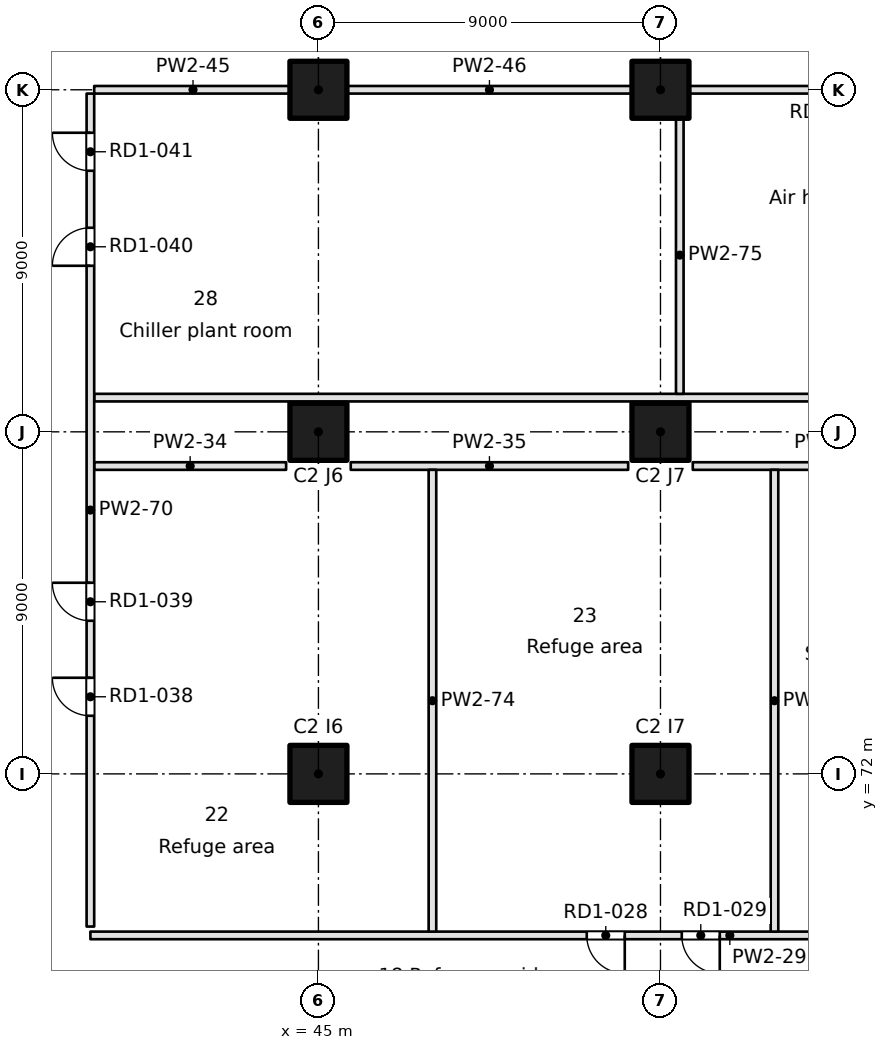
"""IFC4 building model, lengths in metres.
Left out: names, types, materials, properties, quantities, classifications, styles, units other than length and angle.
Written with IfcOpenShell. Run it as: python <this file> out.ifc"""

import sys

from ifc_helpers import new_model, si_unit, direction, frame, frame_2d, origin, origin_2d, place, context, subcontext, project, spatial, rectangle, extrude, element, fill, save


model = new_model("IFC4")
c1 = context("Model", 3, precision=1e-05, world=origin(), true_north=direction((0.0, 1.0)))
c2 = subcontext(c1, "Body", "Model", "MODEL_VIEW")
j1 = project(units=[si_unit("LENGTHUNIT", "METRE"), si_unit("PLANEANGLEUNIT", "RADIAN")], contexts=[c1])
p1 = place(None, origin())
s1 = spatial("IfcSite", under=j1, at=p1, CompositionType="ELEMENT")
p2 = place(p1, origin())
s2 = spatial("IfcBuilding", under=s1, at=p2, CompositionType="ELEMENT")
p3 = place(p2, frame((0.0, 0.0, 31.2)))
s3 = spatial("IfcBuildingStorey", under=s2, at=p3, CompositionType="ELEMENT", Elevation=31.2)
for number, where, z_axis, x_axis in (
    (1, (45.0, 72.0, 0.0), (0.0, 0.0, 1.0), (1.0, 0.0, 0.0)),
    (2, (45.0, 81.0, 0.0), (0.0, 0.0, 1.0), (1.0, 0.0, 0.0)),
    (3, (45.0, 90.0, 0.0), (0.0, 0.0, 1.0), (1.0, 0.0, 0.0)),
    (4, (54.0, 72.0, 0.0), (0.0, 0.0, 1.0), (1.0, 0.0, 0.0)),
    (5, (54.0, 81.0, 0.0), (0.0, 0.0, 1.0), (1.0, 0.0, 0.0)),
    (6, (54.0, 90.0, 0.0), (0.0, 0.0, 1.0), (1.0, 0.0, 0.0)),
):
    element("IfcColumn", number, at=place(p3, frame(where, z_axis=z_axis, x_axis=x_axis)), inside=s3, PredefinedType="COLUMN", context=c2, shape_type="SweptSolid", body=[
        extrude(rectangle(XDim=1.5, YDim=1.5, at=origin_2d()), origin(), (0.0, 0.0, 1.0), 4.6),
    ])
p4 = place(p3, frame((39.0, 67.75, 0.0), z_axis=(0.0, 0.0, 1.0), x_axis=(1.0, 0.0, 0.0)))
e7 = element("IfcWall", 7, at=p4, inside=s3, PredefinedType="PARTITIONING", context=c2, shape_type="SweptSolid", body=[
    extrude(rectangle(XDim=33.65, YDim=0.2, at=frame_2d((16.825, 0.0))), origin(), (0.0, 0.0, 1.0), 4.2),
])
p5 = place(p4, frame((13.06, 0.0, 0.0)))
e8 = element("IfcOpeningElement", 8, at=p5, cuts=e7, PredefinedType="OPENING", context=c2, shape_type="SweptSolid", body=[
    extrude(rectangle(XDim=1.0, YDim=2.1, at=frame_2d((0.5, 1.05))), frame((0.0, 0.1, 0.0), z_axis=(0.0, -1.0, 0.0), x_axis=(1.0, 0.0, 0.0)), (0.0, 0.0, 1.0), 0.2),
])
p6 = place(p4, frame((15.56, 0.0, 0.0)))
e9 = element("IfcOpeningElement", 9, at=p6, cuts=e7, PredefinedType="OPENING", context=c2, shape_type="SweptSolid", body=[
    extrude(rectangle(XDim=1.0, YDim=2.1, at=frame_2d((0.5, 1.05))), frame((0.0, 0.1, 0.0), z_axis=(0.0, -1.0, 0.0), x_axis=(1.0, 0.0, 0.0)), (0.0, 0.0, 1.0), 0.2),
])
p7 = place(p4, frame((22.101, 0.0, 0.0)))
e10 = element("IfcOpeningElement", 10, at=p7, cuts=e7, PredefinedType="OPENING", context=c2, shape_type="SweptSolid", body=[
    extrude(rectangle(XDim=1.0, YDim=2.1, at=frame_2d((0.5, 1.05))), frame((0.0, 0.1, 0.0), z_axis=(0.0, -1.0, 0.0), x_axis=(1.0, 0.0, 0.0)), (0.0, 0.0, 1.0), 0.2),
])
p8 = place(p4, frame((24.601, 0.0, 0.0)))
e11 = element("IfcOpeningElement", 11, at=p8, cuts=e7, PredefinedType="OPENING", context=c2, shape_type="SweptSolid", body=[
    extrude(rectangle(XDim=1.0, YDim=2.1, at=frame_2d((0.5, 1.05))), frame((0.0, 0.1, 0.0), z_axis=(0.0, -1.0, 0.0), x_axis=(1.0, 0.0, 0.0)), (0.0, 0.0, 1.0), 0.2),
])
p9 = place(p4, frame((29.76, 0.0, 0.0)))
e12 = element("IfcOpeningElement", 12, at=p9, cuts=e7, PredefinedType="OPENING", context=c2, shape_type="SweptSolid", body=[
    extrude(rectangle(XDim=1.0, YDim=2.1, at=frame_2d((0.5, 1.05))), frame((0.0, 0.1, 0.0), z_axis=(0.0, -1.0, 0.0), x_axis=(1.0, 0.0, 0.0)), (0.0, 0.0, 1.0), 0.2),
])
p10 = place(p4, frame((32.26, 0.0, 0.0)))
e13 = element("IfcOpeningElement", 13, at=p10, cuts=e7, PredefinedType="OPENING", context=c2, shape_type="SweptSolid", body=[
    extrude(rectangle(XDim=1.0, YDim=2.1, at=frame_2d((0.5, 1.05))), frame((0.0, 0.1, 0.0), z_axis=(0.0, -1.0, 0.0), x_axis=(1.0, 0.0, 0.0)), (0.0, 0.0, 1.0), 0.2),
])
p11 = place(p3, frame((39.1, 80.1, 0.0), z_axis=(0.0, 0.0, 1.0), x_axis=(1.0, 0.0, 0.0)))
e14 = element("IfcWall", 14, at=p11, inside=s3, PredefinedType="PARTITIONING", context=c2, shape_type="SweptSolid", body=[
    extrude(rectangle(XDim=5.05, YDim=0.2, at=frame_2d((2.525, 0.0))), origin(), (0.0, 0.0, 1.0), 4.2),
])
for number, where, z_axis, x_axis in (
    (15, (45.85, 80.1, 0.0), (0.0, 0.0, 1.0), (1.0, 0.0, 0.0)),
    (16, (54.85, 80.1, 0.0), (0.0, 0.0, 1.0), (1.0, 0.0, 0.0)),
):
    element("IfcWall", number, at=place(p3, frame(where, z_axis=z_axis, x_axis=x_axis)), inside=s3, PredefinedType="PARTITIONING", context=c2, shape_type="SweptSolid", body=[
        extrude(rectangle(XDim=7.3, YDim=0.2, at=frame_2d((3.65, 0.0))), origin(), (0.0, 0.0, 1.0), 4.2),
    ])
p12 = place(p3, frame((39.1, 81.9, 0.0), z_axis=(0.0, 0.0, 1.0), x_axis=(1.0, 0.0, 0.0)))
e17 = element("IfcWall", 17, at=p12, inside=s3, PredefinedType="PARTITIONING", context=c2, shape_type="SweptSolid", body=[
    extrude(rectangle(XDim=41.05, YDim=0.2, at=frame_2d((20.525, 0.0))), origin(), (0.0, 0.0, 1.0), 4.2),
])
p13 = place(p3, frame((44.3, 90.0, 0.0), z_axis=(0.0, 0.0, 1.0), x_axis=(-1.0, 0.0, 0.0)))
e18 = element("IfcWall", 18, at=p13, inside=s3, PredefinedType="PARTITIONING", context=c2, shape_type="SweptSolid", body=[
    extrude(rectangle(XDim=5.2, YDim=0.2, at=frame_2d((2.6, 0.0))), origin(), (0.0, 0.0, 1.0), 4.2),
])
p14 = place(p3, frame((53.3, 90.0, 0.0), z_axis=(0.0, 0.0, 1.0), x_axis=(-1.0, 0.0, 0.0)))
e19 = element("IfcWall", 19, at=p14, inside=s3, PredefinedType="PARTITIONING", context=c2, shape_type="SweptSolid", body=[
    extrude(rectangle(XDim=7.6, YDim=0.2, at=frame_2d((3.8, 0.0))), origin(), (0.0, 0.0, 1.0), 4.2),
])
p15 = place(p3, frame((62.3, 90.0, 0.0), z_axis=(0.0, 0.0, 1.0), x_axis=(-1.0, 0.0, 0.0)))
e20 = element("IfcWall", 20, at=p15, inside=s3, PredefinedType="PARTITIONING", context=c2, shape_type="SweptSolid", body=[
    extrude(rectangle(XDim=7.6, YDim=0.2, at=frame_2d((3.8, 0.0))), origin(), (0.0, 0.0, 1.0), 4.2),
])
p16 = place(p15, frame((3.3, 0.0, 0.0)))
e21 = element("IfcOpeningElement", 21, at=p16, cuts=e20, PredefinedType="OPENING", context=c2, shape_type="SweptSolid", body=[
    extrude(rectangle(XDim=1.0, YDim=2.1, at=frame_2d((0.5, 1.05))), frame((0.0, 0.1, 0.0), z_axis=(0.0, -1.0, 0.0), x_axis=(1.0, 0.0, 0.0)), (0.0, 0.0, 1.0), 0.2),
])
p17 = place(p3, frame((39.0, 89.9, 0.0), z_axis=(0.0, 0.0, 1.0), x_axis=(0.0, -1.0, 0.0)))
e22 = element("IfcWall", 22, at=p17, inside=s3, PredefinedType="PARTITIONING", context=c2, shape_type="SweptSolid", body=[
    extrude(rectangle(XDim=21.917, YDim=0.2, at=frame_2d((10.958, 0.0))), origin(), (0.0, 0.0, 1.0), 4.2),
])
p18 = place(p17, frame((15.371, 0.0, 0.0)))
e23 = element("IfcOpeningElement", 23, at=p18, cuts=e22, PredefinedType="OPENING", context=c2, shape_type="SweptSolid", body=[
    extrude(rectangle(XDim=1.0, YDim=2.1, at=frame_2d((0.5, 1.05))), frame((0.0, 0.1, 0.0), z_axis=(0.0, -1.0, 0.0), x_axis=(1.0, 0.0, 0.0)), (0.0, 0.0, 1.0), 0.2),
])
p19 = place(p17, frame((12.871, 0.0, 0.0)))
e24 = element("IfcOpeningElement", 24, at=p19, cuts=e22, PredefinedType="OPENING", context=c2, shape_type="SweptSolid", body=[
    extrude(rectangle(XDim=1.0, YDim=2.1, at=frame_2d((0.5, 1.05))), frame((0.0, 0.1, 0.0), z_axis=(0.0, -1.0, 0.0), x_axis=(1.0, 0.0, 0.0)), (0.0, 0.0, 1.0), 0.2),
])
p20 = place(p17, frame((3.531, 0.0, 0.0)))
e25 = element("IfcOpeningElement", 25, at=p20, cuts=e22, PredefinedType="OPENING", context=c2, shape_type="SweptSolid", body=[
    extrude(rectangle(XDim=1.0, YDim=2.1, at=frame_2d((0.5, 1.05))), frame((0.0, 0.1, 0.0), z_axis=(0.0, -1.0, 0.0), x_axis=(1.0, 0.0, 0.0)), (0.0, 0.0, 1.0), 0.2),
])
p21 = place(p17, frame((1.031, 0.0, 0.0)))
e26 = element("IfcOpeningElement", 26, at=p21, cuts=e22, PredefinedType="OPENING", context=c2, shape_type="SweptSolid", body=[
    extrude(rectangle(XDim=1.0, YDim=2.1, at=frame_2d((0.5, 1.05))), frame((0.0, 0.1, 0.0), z_axis=(0.0, -1.0, 0.0), x_axis=(1.0, 0.0, 0.0)), (0.0, 0.0, 1.0), 0.2),
])
p22 = place(p3, frame((48.0, 80.0, 0.0), z_axis=(0.0, 0.0, 1.0), x_axis=(0.0, -1.0, 0.0)))
e27 = element("IfcWall", 27, at=p22, inside=s3, PredefinedType="PARTITIONING", context=c2, shape_type="SweptSolid", body=[
    extrude(rectangle(XDim=12.15, YDim=0.2, at=frame_2d((6.075, 0.0))), origin(), (0.0, 0.0, 1.0), 4.2),
])
p23 = place(p3, frame((54.508, 89.3, 0.0), z_axis=(0.0, 0.0, 1.0), x_axis=(0.0, -1.0, 0.0)))
e28 = element("IfcWall", 28, at=p23, inside=s3, PredefinedType="PARTITIONING", context=c2, shape_type="SweptSolid", body=[
    extrude(rectangle(XDim=7.3, YDim=0.2, at=frame_2d((3.65, 0.0))), origin(), (0.0, 0.0, 1.0), 4.2),
])
p24 = place(p3, frame((57.0, 80.0, 0.0), z_axis=(0.0, 0.0, 1.0), x_axis=(0.0, -1.0, 0.0)))
e29 = element("IfcWall", 29, at=p24, inside=s3, PredefinedType="PARTITIONING", context=c2, shape_type="SweptSolid", body=[
    extrude(rectangle(XDim=12.15, YDim=0.2, at=frame_2d((6.075, 0.0))), origin(), (0.0, 0.0, 1.0), 4.2),
])
p25 = place(p5, frame((1.0, 0.0, 0.0), z_axis=(0.0, 0.0, 1.0), x_axis=(-1.0, 0.0, 0.0)))
e30 = element("IfcDoor", 30, at=p25, inside=s3, OperationType="SINGLE_SWING_LEFT", PredefinedType="DOOR", context=c2, shape_type="SweptSolid", body=[
    extrude(rectangle(XDim=1.0, YDim=2.1, at=frame_2d((0.5, 1.05))), frame((0.0, 0.025, 0.0), z_axis=(0.0, -1.0, 0.0), x_axis=(1.0, 0.0, 0.0)), (0.0, 0.0, 1.0), 0.05),
])
fill(e8, e30)
p26 = place(p6, frame((1.0, 0.0, 0.0), z_axis=(0.0, 0.0, 1.0), x_axis=(-1.0, 0.0, 0.0)))
e31 = element("IfcDoor", 31, at=p26, inside=s3, OperationType="SINGLE_SWING_LEFT", PredefinedType="DOOR", context=c2, shape_type="SweptSolid", body=[
    extrude(rectangle(XDim=1.0, YDim=2.1, at=frame_2d((0.5, 1.05))), frame((0.0, 0.025, 0.0), z_axis=(0.0, -1.0, 0.0), x_axis=(1.0, 0.0, 0.0)), (0.0, 0.0, 1.0), 0.05),
])
fill(e9, e31)
p27 = place(p18, frame((1.0, 0.0, 0.0), z_axis=(0.0, 0.0, 1.0), x_axis=(-1.0, 0.0, 0.0)))
e32 = element("IfcDoor", 32, at=p27, inside=s3, OperationType="SINGLE_SWING_RIGHT", PredefinedType="DOOR", context=c2, shape_type="SweptSolid", body=[
    extrude(rectangle(XDim=1.0, YDim=2.1, at=frame_2d((0.5, 1.05))), frame((0.0, 0.025, 0.0), z_axis=(0.0, -1.0, 0.0), x_axis=(1.0, 0.0, 0.0)), (0.0, 0.0, 1.0), 0.05),
])
fill(e23, e32)
p28 = place(p19, frame((1.0, 0.0, 0.0), z_axis=(0.0, 0.0, 1.0), x_axis=(-1.0, 0.0, 0.0)))
e33 = element("IfcDoor", 33, at=p28, inside=s3, OperationType="SINGLE_SWING_RIGHT", PredefinedType="DOOR", context=c2, shape_type="SweptSolid", body=[
    extrude(rectangle(XDim=1.0, YDim=2.1, at=frame_2d((0.5, 1.05))), frame((0.0, 0.025, 0.0), z_axis=(0.0, -1.0, 0.0), x_axis=(1.0, 0.0, 0.0)), (0.0, 0.0, 1.0), 0.05),
])
fill(e24, e33)
p29 = place(p20, frame((1.0, 0.0, 0.0), z_axis=(0.0, 0.0, 1.0), x_axis=(-1.0, 0.0, 0.0)))
e34 = element("IfcDoor", 34, at=p29, inside=s3, OperationType="SINGLE_SWING_LEFT", PredefinedType="DOOR", context=c2, shape_type="SweptSolid", body=[
    extrude(rectangle(XDim=1.0, YDim=2.1, at=frame_2d((0.5, 1.05))), frame((0.0, 0.025, 0.0), z_axis=(0.0, -1.0, 0.0), x_axis=(1.0, 0.0, 0.0)), (0.0, 0.0, 1.0), 0.05),
])
fill(e25, e34)
p30 = place(p21, frame((1.0, 0.0, 0.0), z_axis=(0.0, 0.0, 1.0), x_axis=(-1.0, 0.0, 0.0)))
e35 = element("IfcDoor", 35, at=p30, inside=s3, OperationType="SINGLE_SWING_RIGHT", PredefinedType="DOOR", context=c2, shape_type="SweptSolid", body=[
    extrude(rectangle(XDim=1.0, YDim=2.1, at=frame_2d((0.5, 1.05))), frame((0.0, 0.025, 0.0), z_axis=(0.0, -1.0, 0.0), x_axis=(1.0, 0.0, 0.0)), (0.0, 0.0, 1.0), 0.05),
])
fill(e26, e35)
save(model, sys.argv[1])
